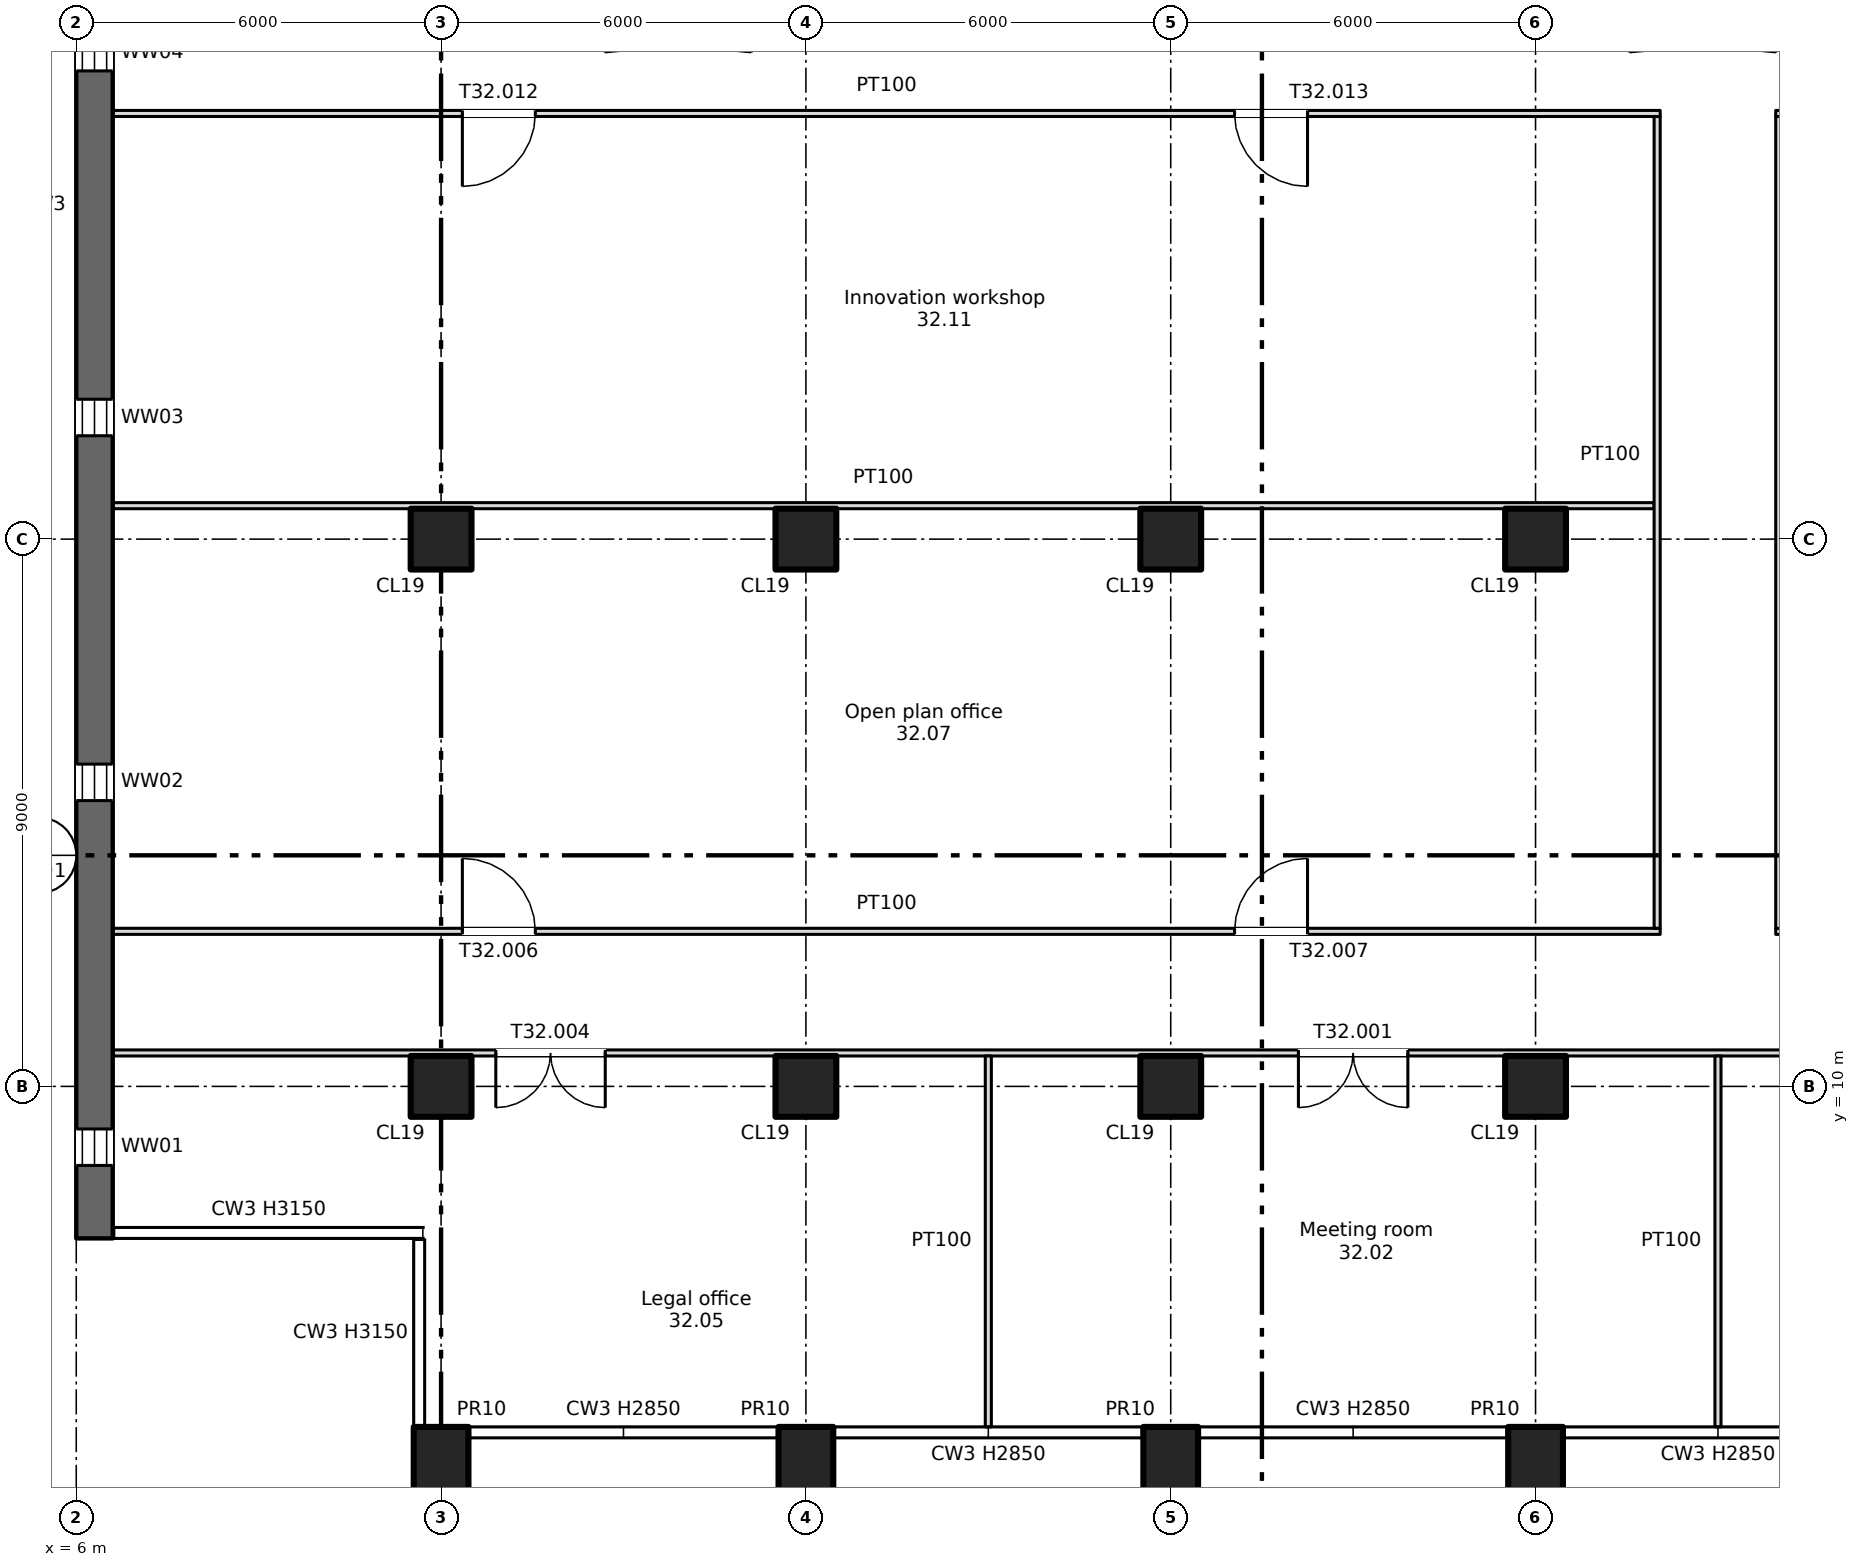
"""IFC4 building model, lengths in metres.
Left out: names, types, materials, properties, quantities, classifications, styles, units other than length and angle.
Written with IfcOpenShell. Run it as: python <this file> out.ifc"""

import sys

from ifc_helpers import new_model, si_unit, direction, frame, frame_2d, origin, origin_2d, place, context, subcontext, project, spatial, rectangle, extrude, element, fill, save


model = new_model("IFC4")
c1 = context("Model", 3, precision=1e-05, world=origin(), true_north=direction((0.0, 1.0)))
c2 = subcontext(c1, "Body", "Model", "MODEL_VIEW")
j1 = project(units=[si_unit("LENGTHUNIT", "METRE"), si_unit("PLANEANGLEUNIT", "RADIAN")], contexts=[c1])
p1 = place(None, origin())
s1 = spatial("IfcSite", under=j1, at=p1, CompositionType="ELEMENT")
p2 = place(p1, origin())
s2 = spatial("IfcBuilding", under=s1, at=p2, CompositionType="ELEMENT")
p3 = place(p2, frame((0.0, 0.0, 223.0)))
s3 = spatial("IfcBuildingStorey", under=s2, at=p3, CompositionType="ELEMENT", Elevation=223.0)
for number, where, z_axis, x_axis in (
    (1, (12.0, 3.7, -0.4), (0.0, 0.0, 1.0), (1.0, 0.0, 0.0)),
    (2, (18.0, 3.7, -0.4), (0.0, 0.0, 1.0), (1.0, 0.0, 0.0)),
    (3, (24.0, 3.7, -0.4), (0.0, 0.0, 1.0), (1.0, 0.0, 0.0)),
    (4, (30.0, 3.7, -0.4), (0.0, 0.0, 1.0), (1.0, 0.0, 0.0)),
):
    element("IfcColumn", number, at=place(p3, frame(where, z_axis=z_axis, x_axis=x_axis)), inside=s3, PredefinedType="COLUMN", context=c2, shape_type="SweptSolid", body=[
        extrude(rectangle(XDim=0.9, YDim=1.4, at=origin_2d()), origin(), (0.0, 0.0, 1.0), 3.55),
    ])
for number, where, z_axis, x_axis in (
    (5, (12.0, 10.0, 0.0), (0.0, 0.0, 1.0), (1.0, 0.0, 0.0)),
    (6, (12.0, 19.0, 0.0), (0.0, 0.0, 1.0), (1.0, 0.0, 0.0)),
    (7, (18.0, 10.0, 0.0), (0.0, 0.0, 1.0), (1.0, 0.0, 0.0)),
    (8, (18.0, 19.0, 0.0), (0.0, 0.0, 1.0), (1.0, 0.0, 0.0)),
    (9, (24.0, 10.0, 0.0), (0.0, 0.0, 1.0), (1.0, 0.0, 0.0)),
    (10, (24.0, 19.0, 0.0), (0.0, 0.0, 1.0), (1.0, 0.0, 0.0)),
    (11, (30.0, 10.0, 0.0), (0.0, 0.0, 1.0), (1.0, 0.0, 0.0)),
    (12, (30.0, 19.0, 0.0), (0.0, 0.0, 1.0), (1.0, 0.0, 0.0)),
):
    element("IfcColumn", number, at=place(p3, frame(where, z_axis=z_axis, x_axis=x_axis)), inside=s3, PredefinedType="COLUMN", context=c2, shape_type="SweptSolid", body=[
        extrude(rectangle(XDim=1.0, YDim=1.0, at=origin_2d()), origin(), (0.0, 0.0, 1.0), 3.15),
    ])
p4 = place(p3, frame((6.3, 7.5, 0.0), z_axis=(0.0, 0.0, 1.0), x_axis=(0.0, 1.0, 0.0)))
e13 = element("IfcWall", 13, at=p4, inside=s3, PredefinedType="SHEAR", context=c2, shape_type="SweptSolid", body=[
    extrude(rectangle(XDim=34.0, YDim=0.6, at=frame_2d((17.0, 0.0))), origin(), (0.0, 0.0, 1.0), 3.15),
])
p5 = place(p4, frame((1.2, 0.0, 0.6)))
e14 = element("IfcOpeningElement", 14, at=p5, cuts=e13, PredefinedType="OPENING", context=c2, shape_type="SweptSolid", body=[
    extrude(rectangle(XDim=0.6, YDim=2.4, at=frame_2d((0.3, 1.2))), frame((0.0, 0.31, 0.0), z_axis=(0.0, -1.0, 0.0), x_axis=(1.0, 0.0, 0.0)), (0.0, 0.0, 1.0), 0.62),
])
p6 = place(p4, frame((7.2, 0.0, 0.6)))
e15 = element("IfcOpeningElement", 15, at=p6, cuts=e13, PredefinedType="OPENING", context=c2, shape_type="SweptSolid", body=[
    extrude(rectangle(XDim=0.6, YDim=2.4, at=frame_2d((0.3, 1.2))), frame((0.0, 0.31, 0.0), z_axis=(0.0, -1.0, 0.0), x_axis=(1.0, 0.0, 0.0)), (0.0, 0.0, 1.0), 0.62),
])
p7 = place(p4, frame((13.2, 0.0, 0.6)))
e16 = element("IfcOpeningElement", 16, at=p7, cuts=e13, PredefinedType="OPENING", context=c2, shape_type="SweptSolid", body=[
    extrude(rectangle(XDim=0.6, YDim=2.4, at=frame_2d((0.3, 1.2))), frame((0.0, 0.31, 0.0), z_axis=(0.0, -1.0, 0.0), x_axis=(1.0, 0.0, 0.0)), (0.0, 0.0, 1.0), 0.62),
])
p8 = place(p4, frame((19.2, 0.0, 0.6)))
e17 = element("IfcOpeningElement", 17, at=p8, cuts=e13, PredefinedType="OPENING", context=c2, shape_type="SweptSolid", body=[
    extrude(rectangle(XDim=0.6, YDim=2.4, at=frame_2d((0.3, 1.2))), frame((0.0, 0.31, 0.0), z_axis=(0.0, -1.0, 0.0), x_axis=(1.0, 0.0, 0.0)), (0.0, 0.0, 1.0), 0.62),
])
p9 = place(p3, frame((6.6, 10.55, 0.0), z_axis=(0.0, 0.0, 1.0), x_axis=(1.0, 0.0, 0.0)))
e18 = element("IfcWall", 18, at=p9, inside=s3, PredefinedType="PARTITIONING", context=c2, shape_type="SweptSolid", body=[
    extrude(rectangle(XDim=64.8, YDim=0.1, at=frame_2d((32.4, 0.0))), origin(), (0.0, 0.0, 1.0), 3.15),
])
p10 = place(p9, frame((19.5, 0.0, 0.0)))
e19 = element("IfcOpeningElement", 19, at=p10, cuts=e18, PredefinedType="OPENING", context=c2, shape_type="SweptSolid", body=[
    extrude(rectangle(XDim=1.8, YDim=2.1, at=frame_2d((0.9, 1.05))), frame((0.0, 0.06, 0.0), z_axis=(0.0, -1.0, 0.0), x_axis=(1.0, 0.0, 0.0)), (0.0, 0.0, 1.0), 0.12),
])
p11 = place(p9, frame((31.5, 0.0, 0.0)))
e20 = element("IfcOpeningElement", 20, at=p11, cuts=e18, PredefinedType="OPENING", context=c2, shape_type="SweptSolid", body=[
    extrude(rectangle(XDim=1.8, YDim=2.1, at=frame_2d((0.9, 1.05))), frame((0.0, 0.06, 0.0), z_axis=(0.0, -1.0, 0.0), x_axis=(1.0, 0.0, 0.0)), (0.0, 0.0, 1.0), 0.12),
])
p12 = place(p9, frame((43.5, 0.0, 0.0)))
e21 = element("IfcOpeningElement", 21, at=p12, cuts=e18, PredefinedType="OPENING", context=c2, shape_type="SweptSolid", body=[
    extrude(rectangle(XDim=1.8, YDim=2.1, at=frame_2d((0.9, 1.05))), frame((0.0, 0.06, 0.0), z_axis=(0.0, -1.0, 0.0), x_axis=(1.0, 0.0, 0.0)), (0.0, 0.0, 1.0), 0.12),
])
p13 = place(p9, frame((6.3, 0.0, 0.0)))
e22 = element("IfcOpeningElement", 22, at=p13, cuts=e18, PredefinedType="OPENING", context=c2, shape_type="SweptSolid", body=[
    extrude(rectangle(XDim=1.8, YDim=2.1, at=frame_2d((0.9, 1.05))), frame((0.0, 0.06, 0.0), z_axis=(0.0, -1.0, 0.0), x_axis=(1.0, 0.0, 0.0)), (0.0, 0.0, 1.0), 0.12),
])
p14 = place(p9, frame((56.7, 0.0, 0.0)))
e23 = element("IfcOpeningElement", 23, at=p14, cuts=e18, PredefinedType="OPENING", context=c2, shape_type="SweptSolid", body=[
    extrude(rectangle(XDim=1.8, YDim=2.1, at=frame_2d((0.9, 1.05))), frame((0.0, 0.06, 0.0), z_axis=(0.0, -1.0, 0.0), x_axis=(1.0, 0.0, 0.0)), (0.0, 0.0, 1.0), 0.12),
])
p15 = place(p3, frame((6.6, 12.55, 0.0), z_axis=(0.0, 0.0, 1.0), x_axis=(1.0, 0.0, 0.0)))
e24 = element("IfcWall", 24, at=p15, inside=s3, PredefinedType="PARTITIONING", context=c2, shape_type="SweptSolid", body=[
    extrude(rectangle(XDim=25.45, YDim=0.1, at=frame_2d((12.725, 0.0))), origin(), (0.0, 0.0, 1.0), 3.15),
])
p16 = place(p15, frame((5.75, 0.0, 0.0)))
e25 = element("IfcOpeningElement", 25, at=p16, cuts=e24, PredefinedType="OPENING", context=c2, shape_type="SweptSolid", body=[
    extrude(rectangle(XDim=1.2, YDim=2.1, at=frame_2d((0.6, 1.05))), frame((0.0, 0.06, 0.0), z_axis=(0.0, -1.0, 0.0), x_axis=(1.0, 0.0, 0.0)), (0.0, 0.0, 1.0), 0.12),
])
p17 = place(p15, frame((18.45, 0.0, 0.0)))
e26 = element("IfcOpeningElement", 26, at=p17, cuts=e24, PredefinedType="OPENING", context=c2, shape_type="SweptSolid", body=[
    extrude(rectangle(XDim=1.2, YDim=2.1, at=frame_2d((0.6, 1.05))), frame((0.0, 0.06, 0.0), z_axis=(0.0, -1.0, 0.0), x_axis=(1.0, 0.0, 0.0)), (0.0, 0.0, 1.0), 0.12),
])
p18 = place(p3, frame((33.95, 12.55, 0.0), z_axis=(0.0, 0.0, 1.0), x_axis=(1.0, 0.0, 0.0)))
e27 = element("IfcWall", 27, at=p18, inside=s3, PredefinedType="PARTITIONING", context=c2, shape_type="SweptSolid", body=[
    extrude(rectangle(XDim=22.1, YDim=0.1, at=frame_2d((11.05, 0.0))), origin(), (0.0, 0.0, 1.0), 3.15),
])
p19 = place(p18, frame((4.95, 0.0, 0.0)))
e28 = element("IfcOpeningElement", 28, at=p19, cuts=e27, PredefinedType="OPENING", context=c2, shape_type="SweptSolid", body=[
    extrude(rectangle(XDim=1.2, YDim=2.1, at=frame_2d((0.6, 1.05))), frame((0.0, 0.06, 0.0), z_axis=(0.0, -1.0, 0.0), x_axis=(1.0, 0.0, 0.0)), (0.0, 0.0, 1.0), 0.12),
])
p20 = place(p18, frame((15.95, 0.0, 0.0)))
e29 = element("IfcOpeningElement", 29, at=p20, cuts=e27, PredefinedType="OPENING", context=c2, shape_type="SweptSolid", body=[
    extrude(rectangle(XDim=1.2, YDim=2.1, at=frame_2d((0.6, 1.05))), frame((0.0, 0.06, 0.0), z_axis=(0.0, -1.0, 0.0), x_axis=(1.0, 0.0, 0.0)), (0.0, 0.0, 1.0), 0.12),
])
p21 = place(p3, frame((6.6, 19.55, 0.0), z_axis=(0.0, 0.0, 1.0), x_axis=(1.0, 0.0, 0.0)))
e30 = element("IfcWall", 30, at=p21, inside=s3, PredefinedType="PARTITIONING", context=c2, shape_type="SweptSolid", body=[
    extrude(rectangle(XDim=25.35, YDim=0.1, at=frame_2d((12.675, 0.0))), origin(), (0.0, 0.0, 1.0), 3.15),
])
p22 = place(p3, frame((6.6, 26.0, 0.0), z_axis=(0.0, 0.0, 1.0), x_axis=(1.0, 0.0, 0.0)))
e31 = element("IfcWall", 31, at=p22, inside=s3, PredefinedType="PARTITIONING", context=c2, shape_type="SweptSolid", body=[
    extrude(rectangle(XDim=25.45, YDim=0.1, at=frame_2d((12.725, 0.0))), origin(), (0.0, 0.0, 1.0), 3.15),
])
p23 = place(p22, frame((5.75, 0.0, 0.0)))
e32 = element("IfcOpeningElement", 32, at=p23, cuts=e31, PredefinedType="OPENING", context=c2, shape_type="SweptSolid", body=[
    extrude(rectangle(XDim=1.2, YDim=2.1, at=frame_2d((0.6, 1.05))), frame((0.0, 0.06, 0.0), z_axis=(0.0, -1.0, 0.0), x_axis=(1.0, 0.0, 0.0)), (0.0, 0.0, 1.0), 0.12),
])
p24 = place(p22, frame((18.45, 0.0, 0.0)))
e33 = element("IfcOpeningElement", 33, at=p24, cuts=e31, PredefinedType="OPENING", context=c2, shape_type="SweptSolid", body=[
    extrude(rectangle(XDim=1.2, YDim=2.1, at=frame_2d((0.6, 1.05))), frame((0.0, 0.06, 0.0), z_axis=(0.0, -1.0, 0.0), x_axis=(1.0, 0.0, 0.0)), (0.0, 0.0, 1.0), 0.12),
])
p25 = place(p3, frame((33.95, 26.0, 0.0), z_axis=(0.0, 0.0, 1.0), x_axis=(1.0, 0.0, 0.0)))
e34 = element("IfcWall", 34, at=p25, inside=s3, PredefinedType="PARTITIONING", context=c2, shape_type="SweptSolid", body=[
    extrude(rectangle(XDim=22.1, YDim=0.1, at=frame_2d((11.05, 0.0))), origin(), (0.0, 0.0, 1.0), 3.15),
])
p26 = place(p25, frame((10.15, 0.0, 0.0)))
e35 = element("IfcOpeningElement", 35, at=p26, cuts=e34, PredefinedType="OPENING", context=c2, shape_type="SweptSolid", body=[
    extrude(rectangle(XDim=1.8, YDim=2.1, at=frame_2d((0.9, 1.05))), frame((0.0, 0.06, 0.0), z_axis=(0.0, -1.0, 0.0), x_axis=(1.0, 0.0, 0.0)), (0.0, 0.0, 1.0), 0.12),
])
p27 = place(p3, frame((21.0, 4.4, 0.0), z_axis=(0.0, 0.0, 1.0), x_axis=(0.0, 1.0, 0.0)))
e36 = element("IfcWall", 36, at=p27, inside=s3, PredefinedType="PARTITIONING", context=c2, shape_type="SweptSolid", body=[
    extrude(rectangle(XDim=6.1, YDim=0.1, at=frame_2d((3.05, 0.0))), origin(), (0.0, 0.0, 1.0), 3.15),
])
p28 = place(p3, frame((32.0, 12.6, 0.0), z_axis=(0.0, 0.0, 1.0), x_axis=(0.0, 1.0, 0.0)))
e37 = element("IfcWall", 37, at=p28, inside=s3, PredefinedType="PARTITIONING", context=c2, shape_type="SweptSolid", body=[
    extrude(rectangle(XDim=13.35, YDim=0.1, at=frame_2d((6.675, 0.0))), origin(), (0.0, 0.0, 1.0), 3.15),
])
p29 = place(p3, frame((33.0, 4.4, 0.0), z_axis=(0.0, 0.0, 1.0), x_axis=(0.0, 1.0, 0.0)))
e38 = element("IfcWall", 38, at=p29, inside=s3, PredefinedType="PARTITIONING", context=c2, shape_type="SweptSolid", body=[
    extrude(rectangle(XDim=6.1, YDim=0.1, at=frame_2d((3.05, 0.0))), origin(), (0.0, 0.0, 1.0), 3.15),
])
p30 = place(p3, frame((34.0, 12.6, 0.0), z_axis=(0.0, 0.0, 1.0), x_axis=(0.0, 1.0, 0.0)))
e39 = element("IfcWall", 39, at=p30, inside=s3, PredefinedType="PARTITIONING", context=c2, shape_type="SweptSolid", body=[
    extrude(rectangle(XDim=13.35, YDim=0.1, at=frame_2d((6.675, 0.0))), origin(), (0.0, 0.0, 1.0), 3.15),
])
p31 = place(p5, origin())
e40 = element("IfcWindow", 40, at=p31, inside=s3, PartitioningType="SINGLE_PANEL", PredefinedType="WINDOW", context=c2, shape_type="SweptSolid", body=[
    extrude(rectangle(XDim=0.6, YDim=2.4, at=frame_2d((0.3, 1.2))), frame((0.0, 0.03, 0.0), z_axis=(0.0, -1.0, 0.0), x_axis=(1.0, 0.0, 0.0)), (0.0, 0.0, 1.0), 0.06),
])
fill(e14, e40)
p32 = place(p6, origin())
e41 = element("IfcWindow", 41, at=p32, inside=s3, PartitioningType="SINGLE_PANEL", PredefinedType="WINDOW", context=c2, shape_type="SweptSolid", body=[
    extrude(rectangle(XDim=0.6, YDim=2.4, at=frame_2d((0.3, 1.2))), frame((0.0, 0.03, 0.0), z_axis=(0.0, -1.0, 0.0), x_axis=(1.0, 0.0, 0.0)), (0.0, 0.0, 1.0), 0.06),
])
fill(e15, e41)
p33 = place(p7, origin())
e42 = element("IfcWindow", 42, at=p33, inside=s3, PartitioningType="SINGLE_PANEL", PredefinedType="WINDOW", context=c2, shape_type="SweptSolid", body=[
    extrude(rectangle(XDim=0.6, YDim=2.4, at=frame_2d((0.3, 1.2))), frame((0.0, 0.03, 0.0), z_axis=(0.0, -1.0, 0.0), x_axis=(1.0, 0.0, 0.0)), (0.0, 0.0, 1.0), 0.06),
])
fill(e16, e42)
p34 = place(p8, origin())
e43 = element("IfcWindow", 43, at=p34, inside=s3, PartitioningType="SINGLE_PANEL", PredefinedType="WINDOW", context=c2, shape_type="SweptSolid", body=[
    extrude(rectangle(XDim=0.6, YDim=2.4, at=frame_2d((0.3, 1.2))), frame((0.0, 0.03, 0.0), z_axis=(0.0, -1.0, 0.0), x_axis=(1.0, 0.0, 0.0)), (0.0, 0.0, 1.0), 0.06),
])
fill(e17, e43)
p35 = place(p10, origin())
e44 = element("IfcDoor", 44, at=p35, inside=s3, OperationType="DOUBLE_DOOR_SINGLE_SWING", PredefinedType="DOOR", context=c2, shape_type="SweptSolid", body=[
    extrude(rectangle(XDim=1.8, YDim=2.1, at=frame_2d((0.9, 1.05))), frame((0.0, 0.025, 0.0), z_axis=(0.0, -1.0, 0.0), x_axis=(1.0, 0.0, 0.0)), (0.0, 0.0, 1.0), 0.05),
])
fill(e19, e44)
p36 = place(p13, origin())
e45 = element("IfcDoor", 45, at=p36, inside=s3, OperationType="DOUBLE_DOOR_SINGLE_SWING", PredefinedType="DOOR", context=c2, shape_type="SweptSolid", body=[
    extrude(rectangle(XDim=1.8, YDim=2.1, at=frame_2d((0.9, 1.05))), frame((0.0, 0.025, 0.0), z_axis=(0.0, -1.0, 0.0), x_axis=(1.0, 0.0, 0.0)), (0.0, 0.0, 1.0), 0.05),
])
fill(e22, e45)
p37 = place(p16, origin())
e46 = element("IfcDoor", 46, at=p37, inside=s3, OperationType="SINGLE_SWING_LEFT", PredefinedType="DOOR", context=c2, shape_type="SweptSolid", body=[
    extrude(rectangle(XDim=1.2, YDim=2.1, at=frame_2d((0.6, 1.05))), frame((0.0, 0.025, 0.0), z_axis=(0.0, -1.0, 0.0), x_axis=(1.0, 0.0, 0.0)), (0.0, 0.0, 1.0), 0.05),
])
fill(e25, e46)
p38 = place(p17, origin())
e47 = element("IfcDoor", 47, at=p38, inside=s3, OperationType="SINGLE_SWING_RIGHT", PredefinedType="DOOR", context=c2, shape_type="SweptSolid", body=[
    extrude(rectangle(XDim=1.2, YDim=2.1, at=frame_2d((0.6, 1.05))), frame((0.0, 0.025, 0.0), z_axis=(0.0, -1.0, 0.0), x_axis=(1.0, 0.0, 0.0)), (0.0, 0.0, 1.0), 0.05),
])
fill(e26, e47)
p39 = place(p23, origin())
e48 = element("IfcDoor", 48, at=p39, inside=s3, OperationType="SINGLE_SWING_LEFT", PredefinedType="DOOR", context=c2, shape_type="SweptSolid", body=[
    extrude(rectangle(XDim=1.2, YDim=2.1, at=frame_2d((0.6, 1.05))), frame((0.0, 0.025, 0.0), z_axis=(0.0, -1.0, 0.0), x_axis=(1.0, 0.0, 0.0)), (0.0, 0.0, 1.0), 0.05),
])
fill(e32, e48)
p40 = place(p24, origin())
e49 = element("IfcDoor", 49, at=p40, inside=s3, OperationType="SINGLE_SWING_RIGHT", PredefinedType="DOOR", context=c2, shape_type="SweptSolid", body=[
    extrude(rectangle(XDim=1.2, YDim=2.1, at=frame_2d((0.6, 1.05))), frame((0.0, 0.025, 0.0), z_axis=(0.0, -1.0, 0.0), x_axis=(1.0, 0.0, 0.0)), (0.0, 0.0, 1.0), 0.05),
])
fill(e33, e49)
save(model, sys.argv[1])
